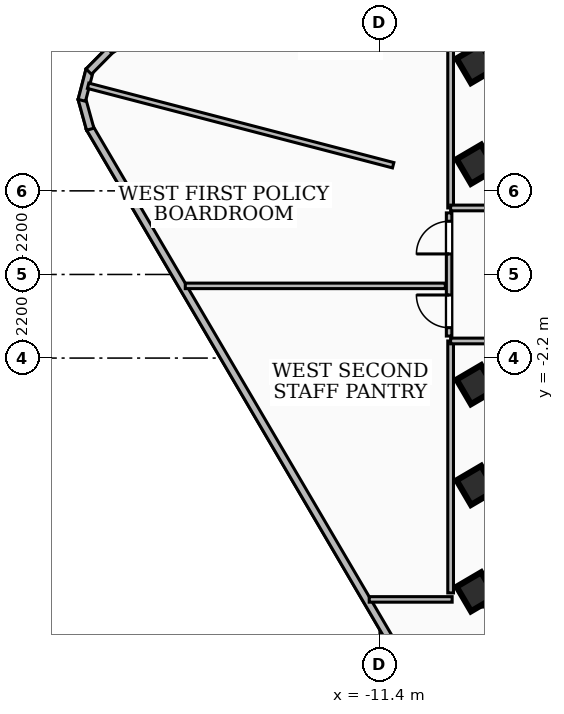
"""IFC4 building model, lengths in metres.
Left out: names, types, materials, properties, quantities, classifications, styles, units other than length and angle.
Written with IfcOpenShell. Run it as: python <this file> out.ifc"""

import sys

from ifc_helpers import new_model, si_unit, direction, frame, frame_2d, origin, origin_2d, place, context, subcontext, project, spatial, rectangle, extrude, element, fill, save


model = new_model("IFC4")
c1 = context("Model", 3, precision=1e-05, world=origin(), true_north=direction((0.0, 1.0)))
c2 = subcontext(c1, "Body", "Model", "MODEL_VIEW")
j1 = project(units=[si_unit("LENGTHUNIT", "METRE"), si_unit("PLANEANGLEUNIT", "RADIAN")], contexts=[c1])
p1 = place(None, origin())
s1 = spatial("IfcSite", under=j1, at=p1, CompositionType="ELEMENT")
p2 = place(p1, origin())
s2 = spatial("IfcBuilding", under=s1, at=p2, CompositionType="ELEMENT")
p3 = place(p2, frame((0.0, 0.0, 205.2)))
s3 = spatial("IfcBuildingStorey", under=s2, at=p3, CompositionType="ELEMENT", Elevation=205.2)
p4 = place(p3, frame((8.78, -8.51, 0.0), z_axis=(0.0, 0.0, 1.0), x_axis=(-1.0, 0.0, 0.0)))
e1 = element("IfcWall", 1, at=p4, inside=s3, PredefinedType="SHEAR", context=c2, shape_type="SweptSolid", body=[
    extrude(rectangle(XDim=17.56, YDim=0.4, at=frame_2d((8.78, 0.0))), origin(), (0.0, 0.0, 1.0), 3.16),
])
for number, where, z_axis, x_axis in (
    (2, (-8.85, -5.55, 0.0), (0.0, 0.0, 1.0), (0.863, 0.506, 0.0)),
    (3, (-8.85, -2.9, 0.0), (0.0, 0.0, 1.0), (0.863, 0.506, 0.0)),
    (4, (-8.85, 2.9, 0.0), (0.0, 0.0, 1.0), (0.863, 0.506, 0.0)),
    (5, (-8.85, 5.55, 0.0), (0.0, 0.0, 1.0), (0.863, 0.506, 0.0)),
    (6, (-8.85, -8.35, 0.0), (0.0, 0.0, 1.0), (0.863, 0.506, 0.0)),
):
    element("IfcColumn", number, at=place(p3, frame(where, z_axis=z_axis, x_axis=x_axis)), inside=s3, PredefinedType="COLUMN", context=c2, shape_type="SweptSolid", body=[
        extrude(rectangle(XDim=0.75, YDim=0.75, at=origin_2d()), origin(), (0.0, 0.0, 1.0), 3.42),
    ])
p5 = place(p3, frame((-5.904, -18.492, 0.0), z_axis=(0.0, 0.0, 1.0), x_axis=(-0.506046465446, 0.862506217258, 0.0)))
e7 = element("IfcWall", 7, at=p5, inside=s3, PredefinedType="SOLIDWALL", context=c2, shape_type="SweptSolid", body=[
    extrude(rectangle(XDim=25.924, YDim=0.2, at=frame_2d((12.962, 0.0))), origin(), (0.0, 0.0, 1.0), 3.16),
])
p6 = place(p5, frame((0.85, 0.0, 0.85)))
e8 = element("IfcOpeningElement", 8, at=p6, cuts=e7, PredefinedType="OPENING", context=c2, shape_type="SweptSolid", body=[
    extrude(rectangle(XDim=1.8, YDim=2.0, at=frame_2d((0.9, 1.0))), frame((0.0, 0.11, 0.0), z_axis=(0.0, -1.0, 0.0), x_axis=(1.0, 0.0, 0.0)), (0.0, 0.0, 1.0), 0.22),
])
p7 = place(p3, frame((-19.003, 3.822, 0.0), z_axis=(0.0, 0.0, 1.0), x_axis=(-0.266246353668, 0.963905015631, 0.0)))
e9 = element("IfcWall", 9, at=p7, inside=s3, PredefinedType="SOLIDWALL", context=c2, shape_type="SweptSolid", body=[
    extrude(rectangle(XDim=0.838, YDim=0.2, at=frame_2d((0.419, 0.0))), origin(), (0.0, 0.0, 1.0), 3.16),
])
p8 = place(p3, frame((-19.225, 4.582, 0.0), z_axis=(0.0, 0.0, 1.0), x_axis=(0.251167733737, 0.967943577658, 0.0)))
e10 = element("IfcWall", 10, at=p8, inside=s3, PredefinedType="SOLIDWALL", context=c2, shape_type="SweptSolid", body=[
    extrude(rectangle(XDim=0.824, YDim=0.2, at=frame_2d((0.412, 0.0))), origin(), (0.0, 0.0, 1.0), 3.16),
])
p9 = place(p3, frame((-19.042, 5.338, 0.0), z_axis=(0.0, 0.0, 1.0), x_axis=(0.702877524881, 0.711310891957, 0.0)))
e11 = element("IfcWall", 11, at=p9, inside=s3, PredefinedType="SOLIDWALL", context=c2, shape_type="SweptSolid", body=[
    extrude(rectangle(XDim=0.84, YDim=0.2, at=frame_2d((0.42, 0.0))), origin(), (0.0, 0.0, 1.0), 3.16),
])
p10 = place(p3, frame((-18.492, 5.904, 0.0), z_axis=(0.0, 0.0, 1.0), x_axis=(0.86245977502, 0.506125613333, 0.0)))
e12 = element("IfcWall", 12, at=p10, inside=s3, PredefinedType="SOLIDWALL", context=c2, shape_type="SweptSolid", body=[
    extrude(rectangle(XDim=6.741, YDim=0.2, at=frame_2d((3.371, 0.0))), origin(), (0.0, 0.0, 1.0), 3.16),
])
p11 = place(p3, frame((-9.52, 1.75, 0.0), z_axis=(0.0, 0.0, 1.0), x_axis=(0.0, 1.0, 0.0)))
e13 = element("IfcWall", 13, at=p11, inside=s3, PredefinedType="PARTITIONING", context=c2, shape_type="SweptSolid", body=[
    extrude(rectangle(XDim=6.63, YDim=0.15, at=frame_2d((3.315, 0.0))), origin(), (0.0, 0.0, 1.0), 3.16),
])
p12 = place(p3, frame((-7.85, 1.75, 0.0), z_axis=(0.0, 0.0, 1.0), x_axis=(-1.0, 0.0, 0.0)))
e14 = element("IfcWall", 14, at=p12, inside=s3, PredefinedType="PARTITIONING", context=c2, shape_type="SweptSolid", body=[
    extrude(rectangle(XDim=1.67, YDim=0.15, at=frame_2d((0.835, 0.0))), origin(), (0.0, 0.0, 1.0), 2.39),
])
p13 = place(p3, frame((-9.52, -8.38, 0.0), z_axis=(0.0, 0.0, 1.0), x_axis=(0.0, 1.0, 0.0)))
e15 = element("IfcWall", 15, at=p13, inside=s3, PredefinedType="PARTITIONING", context=c2, shape_type="SweptSolid", body=[
    extrude(rectangle(XDim=6.63, YDim=0.15, at=frame_2d((3.315, 0.0))), origin(), (0.0, 0.0, 1.0), 3.16),
])
p14 = place(p3, frame((-7.85, -1.75, 0.0), z_axis=(0.0, 0.0, 1.0), x_axis=(-1.0, 0.0, 0.0)))
e16 = element("IfcWall", 16, at=p14, inside=s3, PredefinedType="PARTITIONING", context=c2, shape_type="SweptSolid", body=[
    extrude(rectangle(XDim=1.67, YDim=0.15, at=frame_2d((0.835, 0.0))), origin(), (0.0, 0.0, 1.0), 2.39),
])
p15 = place(p3, frame((-16.502, -0.3, 0.0), z_axis=(0.0, 0.0, 1.0), x_axis=(1.0, 0.0, 0.0)))
e17 = element("IfcWall", 17, at=p15, inside=s3, PredefinedType="PARTITIONING", context=c2, shape_type="SweptSolid", body=[
    extrude(rectangle(XDim=6.842, YDim=0.145, at=frame_2d((3.421, 0.0))), origin(), (0.0, 0.0, 1.0), 3.16),
])
p16 = place(p3, frame((-11.662, -8.55, 0.0), z_axis=(0.0, 0.0, 1.0), x_axis=(1.0, 0.0, 0.0)))
e18 = element("IfcWall", 18, at=p16, inside=s3, PredefinedType="PARTITIONING", context=c2, shape_type="SweptSolid", body=[
    extrude(rectangle(XDim=2.182, YDim=0.145, at=frame_2d((1.091, 0.0))), origin(), (0.0, 0.0, 1.0), 3.16),
])
p17 = place(p3, frame((-9.56, -1.62, 0.0), z_axis=(0.0, 0.0, 1.0), x_axis=(0.0, 1.0, 0.0)))
e19 = element("IfcWall", 19, at=p17, inside=s3, PredefinedType="PARTITIONING", context=c2, shape_type="SweptSolid", body=[
    extrude(rectangle(XDim=3.24, YDim=0.145, at=frame_2d((1.62, 0.0))), origin(), (0.0, 0.0, 1.0), 3.16),
])
p18 = place(p17, frame((0.22, 0.0, 0.0)))
e20 = element("IfcOpeningElement", 20, at=p18, cuts=e19, PredefinedType="OPENING", context=c2, shape_type="SweptSolid", body=[
    extrude(rectangle(XDim=0.86, YDim=2.04, at=frame_2d((0.43, 1.02))), frame((0.0, 0.083, 0.0), z_axis=(0.0, -1.0, 0.0), x_axis=(1.0, 0.0, 0.0)), (0.0, 0.0, 1.0), 0.165),
])
p19 = place(p17, frame((2.16, 0.0, 0.0)))
e21 = element("IfcOpeningElement", 21, at=p19, cuts=e19, PredefinedType="OPENING", context=c2, shape_type="SweptSolid", body=[
    extrude(rectangle(XDim=0.86, YDim=2.04, at=frame_2d((0.43, 1.02))), frame((0.0, 0.083, 0.0), z_axis=(0.0, -1.0, 0.0), x_axis=(1.0, 0.0, 0.0)), (0.0, 0.0, 1.0), 0.165),
])
p20 = place(p3, frame((-11.032, 2.874, 0.0), z_axis=(0.0, 0.0, 1.0), x_axis=(-0.967704417597, 0.252087604146, 0.0)))
e22 = element("IfcWall", 22, at=p20, inside=s3, PredefinedType="PARTITIONING", context=c2, shape_type="SweptSolid", body=[
    extrude(rectangle(XDim=8.295, YDim=0.145, at=frame_2d((4.147, 0.0))), origin(), (0.0, 0.0, 1.0), 3.16),
])
p21 = place(p18, origin())
e23 = element("IfcDoor", 23, at=p21, inside=s3, OperationType="SINGLE_SWING_RIGHT", PredefinedType="DOOR", context=c2, shape_type="SweptSolid", body=[
    extrude(rectangle(XDim=0.86, YDim=2.04, at=frame_2d((0.43, 1.02))), frame((0.0, 0.025, 0.0), z_axis=(0.0, -1.0, 0.0), x_axis=(1.0, 0.0, 0.0)), (0.0, 0.0, 1.0), 0.05),
])
fill(e20, e23)
p22 = place(p19, origin())
e24 = element("IfcDoor", 24, at=p22, inside=s3, OperationType="SINGLE_SWING_LEFT", PredefinedType="DOOR", context=c2, shape_type="SweptSolid", body=[
    extrude(rectangle(XDim=0.86, YDim=2.04, at=frame_2d((0.43, 1.02))), frame((0.0, 0.025, 0.0), z_axis=(0.0, -1.0, 0.0), x_axis=(1.0, 0.0, 0.0)), (0.0, 0.0, 1.0), 0.05),
])
fill(e21, e24)
save(model, sys.argv[1])
